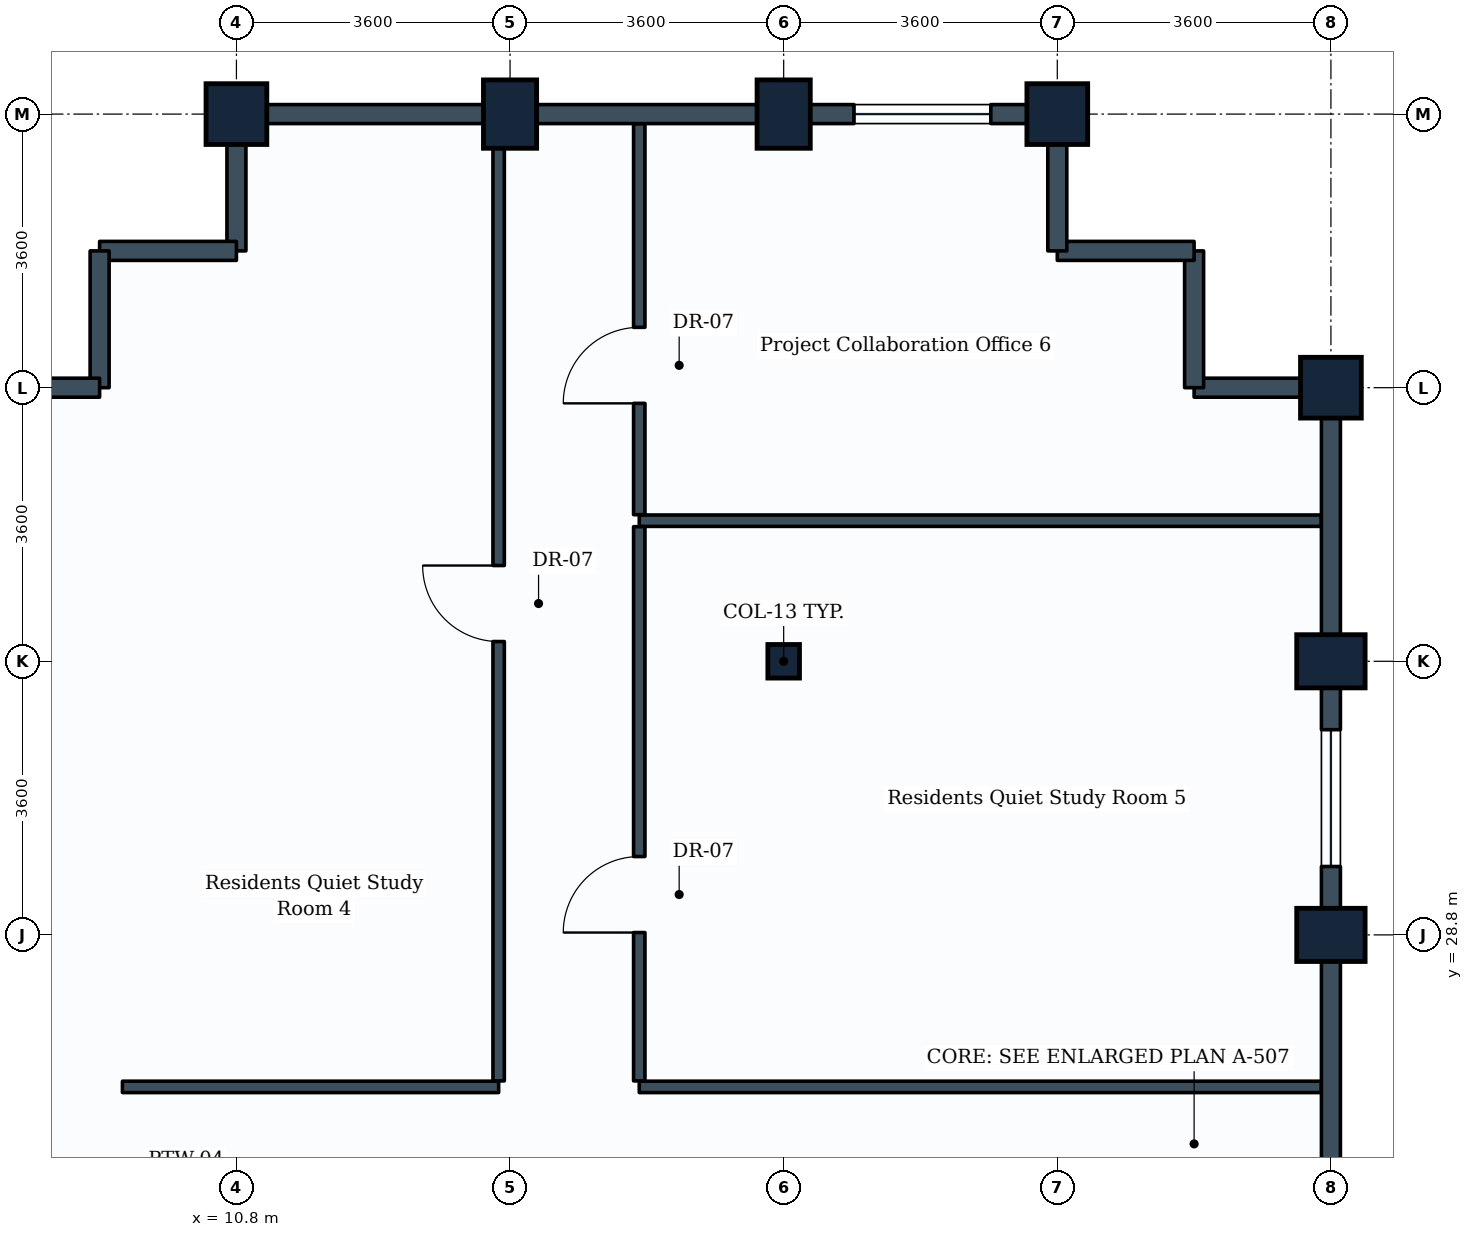
"""IFC4 building model, lengths in metres.
Left out: names, types, materials, properties, quantities, classifications, styles, units other than length and angle.
Written with IfcOpenShell. Run it as: python <this file> out.ifc"""

import sys

from ifc_helpers import new_model, si_unit, direction, frame, frame_2d, origin, origin_2d, place, context, subcontext, project, spatial, rectangle, i_section, extrude, element, fill, save


model = new_model("IFC4")
c1 = context("Model", 3, precision=1e-05, world=origin(), true_north=direction((0.0, 1.0)))
c2 = subcontext(c1, "Body", "Model", "MODEL_VIEW")
j1 = project(units=[si_unit("LENGTHUNIT", "METRE"), si_unit("PLANEANGLEUNIT", "RADIAN")], contexts=[c1])
p1 = place(None, origin())
s1 = spatial("IfcSite", under=j1, at=p1, CompositionType="ELEMENT")
p2 = place(p1, origin())
s2 = spatial("IfcBuilding", under=s1, at=p2, CompositionType="ELEMENT")
p3 = place(p2, frame((0.0, 0.0, 190.0)))
s3 = spatial("IfcBuildingStorey", under=s2, at=p3, CompositionType="ELEMENT", Elevation=190.0)
p4 = place(p3, frame((10.8, 39.6, 0.0), z_axis=(0.0, 0.0, 1.0), x_axis=(1.0, 0.0, 0.0)))
e1 = element("IfcColumn", 1, at=p4, inside=s3, PredefinedType="COLUMN", context=c2, shape_type="SweptSolid", body=[
    extrude(rectangle(XDim=0.8, YDim=0.8, at=origin_2d()), origin(), (0.0, 0.0, 1.0), 3.8),
])
p5 = place(p3, frame((14.4, 39.6, 0.0), z_axis=(0.0, 0.0, 1.0), x_axis=(1.0, 0.0, 0.0)))
e2 = element("IfcColumn", 2, at=p5, inside=s3, PredefinedType="COLUMN", context=c2, shape_type="SweptSolid", body=[
    extrude(rectangle(XDim=0.7, YDim=0.9, at=origin_2d()), origin(), (0.0, 0.0, 1.0), 3.8),
])
p6 = place(p3, frame((18.0, 32.4, 0.0), z_axis=(0.0, 0.0, 1.0), x_axis=(1.0, 0.0, 0.0)))
e3 = element("IfcColumn", 3, at=p6, inside=s3, PredefinedType="COLUMN", context=c2, shape_type="SweptSolid", body=[
    extrude(i_section(OverallWidth=0.416, OverallDepth=0.442, WebThickness=0.025, FlangeThickness=0.041, FilletRadius=0.015, at=origin_2d()), origin(), (0.0, 0.0, 1.0), 3.8),
])
p7 = place(p3, frame((18.0, 39.6, 0.0), z_axis=(0.0, 0.0, 1.0), x_axis=(1.0, 0.0, 0.0)))
e4 = element("IfcColumn", 4, at=p7, inside=s3, PredefinedType="COLUMN", context=c2, shape_type="SweptSolid", body=[
    extrude(rectangle(XDim=0.7, YDim=0.9, at=origin_2d()), origin(), (0.0, 0.0, 1.0), 3.8),
])
p8 = place(p3, frame((21.6, 39.6, 0.0), z_axis=(0.0, 0.0, 1.0), x_axis=(1.0, 0.0, 0.0)))
e5 = element("IfcColumn", 5, at=p8, inside=s3, PredefinedType="COLUMN", context=c2, shape_type="SweptSolid", body=[
    extrude(rectangle(XDim=0.8, YDim=0.8, at=origin_2d()), origin(), (0.0, 0.0, 1.0), 3.8),
])
for number, where, z_axis, x_axis in (
    (6, (25.2, 28.8, 0.0), (0.0, 0.0, 1.0), (0.0, 1.0, 0.0)),
    (7, (25.2, 32.4, 0.0), (0.0, 0.0, 1.0), (0.0, 1.0, 0.0)),
):
    element("IfcColumn", number, at=place(p3, frame(where, z_axis=z_axis, x_axis=x_axis)), inside=s3, PredefinedType="COLUMN", context=c2, shape_type="SweptSolid", body=[
        extrude(rectangle(XDim=0.7, YDim=0.9, at=origin_2d()), origin(), (0.0, 0.0, 1.0), 3.8),
    ])
p9 = place(p3, frame((25.2, 36.0, 0.0), z_axis=(0.0, 0.0, 1.0), x_axis=(0.0, 1.0, 0.0)))
e8 = element("IfcColumn", 8, at=p9, inside=s3, PredefinedType="COLUMN", context=c2, shape_type="SweptSolid", body=[
    extrude(rectangle(XDim=0.8, YDim=0.8, at=origin_2d()), origin(), (0.0, 0.0, 1.0), 3.8),
])
p10 = place(p3, frame((25.2, 25.2, 0.0), z_axis=(0.0, 0.0, 1.0), x_axis=(0.0, 1.0, 0.0)))
e9 = element("IfcWall", 9, at=p10, inside=s3, PredefinedType="STANDARD", context=c2, shape_type="SweptSolid", body=[
    extrude(rectangle(XDim=3.6, YDim=0.25, at=frame_2d((1.8, 0.0))), origin(), (0.0, 0.0, 1.0), 2.93),
])
p11 = place(p3, frame((25.2, 28.8, 0.0), z_axis=(0.0, 0.0, 1.0), x_axis=(0.0, 1.0, 0.0)))
e10 = element("IfcWall", 10, at=p11, inside=s3, PredefinedType="STANDARD", context=c2, shape_type="SweptSolid", body=[
    extrude(rectangle(XDim=3.6, YDim=0.25, at=frame_2d((1.8, 0.0))), origin(), (0.0, 0.0, 1.0), 2.93),
])
p12 = place(p11, frame((0.9, 0.0, 0.85)))
e11 = element("IfcOpeningElement", 11, at=p12, cuts=e10, PredefinedType="OPENING", context=c2, shape_type="SweptSolid", body=[
    extrude(rectangle(XDim=1.8, YDim=1.35, at=frame_2d((0.9, 0.675))), frame((0.0, 0.135, 0.0), z_axis=(0.0, -1.0, 0.0), x_axis=(1.0, 0.0, 0.0)), (0.0, 0.0, 1.0), 0.27),
])
p13 = place(p3, frame((25.2, 32.4, 0.0), z_axis=(0.0, 0.0, 1.0), x_axis=(0.0, 1.0, 0.0)))
e12 = element("IfcWall", 12, at=p13, inside=s3, PredefinedType="STANDARD", context=c2, shape_type="SweptSolid", body=[
    extrude(rectangle(XDim=3.6, YDim=0.25, at=frame_2d((1.8, 0.0))), origin(), (0.0, 0.0, 1.0), 2.93),
])
p14 = place(p3, frame((23.4, 36.0, 0.0), z_axis=(0.0, 0.0, 1.0), x_axis=(1.0, 0.0, 0.0)))
e13 = element("IfcWall", 13, at=p14, inside=s3, PredefinedType="STANDARD", context=c2, shape_type="SweptSolid", body=[
    extrude(rectangle(XDim=1.8, YDim=0.25, at=frame_2d((0.9, 0.0))), origin(), (0.0, 0.0, 1.0), 2.93),
])
p15 = place(p3, frame((23.4, 36.0, 0.0), z_axis=(0.0, 0.0, 1.0), x_axis=(0.0, 1.0, 0.0)))
e14 = element("IfcWall", 14, at=p15, inside=s3, PredefinedType="STANDARD", context=c2, shape_type="SweptSolid", body=[
    extrude(rectangle(XDim=1.8, YDim=0.25, at=frame_2d((0.9, 0.0))), origin(), (0.0, 0.0, 1.0), 3.535),
])
p16 = place(p3, frame((21.6, 37.8, 0.0), z_axis=(0.0, 0.0, 1.0), x_axis=(1.0, 0.0, 0.0)))
e15 = element("IfcWall", 15, at=p16, inside=s3, PredefinedType="STANDARD", context=c2, shape_type="SweptSolid", body=[
    extrude(rectangle(XDim=1.8, YDim=0.25, at=frame_2d((0.9, 0.0))), origin(), (0.0, 0.0, 1.0), 3.535),
])
p17 = place(p3, frame((21.6, 37.8, 0.0), z_axis=(0.0, 0.0, 1.0), x_axis=(0.0, 1.0, 0.0)))
e16 = element("IfcWall", 16, at=p17, inside=s3, PredefinedType="STANDARD", context=c2, shape_type="SweptSolid", body=[
    extrude(rectangle(XDim=1.8, YDim=0.25, at=frame_2d((0.9, 0.0))), origin(), (0.0, 0.0, 1.0), 2.93),
])
p18 = place(p3, frame((18.0, 39.6, 0.0), z_axis=(0.0, 0.0, 1.0), x_axis=(1.0, 0.0, 0.0)))
e17 = element("IfcWall", 17, at=p18, inside=s3, PredefinedType="STANDARD", context=c2, shape_type="SweptSolid", body=[
    extrude(rectangle(XDim=3.6, YDim=0.25, at=frame_2d((1.8, 0.0))), origin(), (0.0, 0.0, 1.0), 2.93),
])
p19 = place(p18, frame((0.925, 0.0, 0.85)))
e18 = element("IfcOpeningElement", 18, at=p19, cuts=e17, PredefinedType="OPENING", context=c2, shape_type="SweptSolid", body=[
    extrude(rectangle(XDim=1.8, YDim=1.35, at=frame_2d((0.9, 0.675))), frame((0.0, 0.135, 0.0), z_axis=(0.0, -1.0, 0.0), x_axis=(1.0, 0.0, 0.0)), (0.0, 0.0, 1.0), 0.27),
])
p20 = place(p3, frame((14.4, 39.6, 0.0), z_axis=(0.0, 0.0, 1.0), x_axis=(1.0, 0.0, 0.0)))
e19 = element("IfcWall", 19, at=p20, inside=s3, PredefinedType="STANDARD", context=c2, shape_type="SweptSolid", body=[
    extrude(rectangle(XDim=3.6, YDim=0.25, at=frame_2d((1.8, 0.0))), origin(), (0.0, 0.0, 1.0), 2.93),
])
p21 = place(p3, frame((10.8, 39.6, 0.0), z_axis=(0.0, 0.0, 1.0), x_axis=(1.0, 0.0, 0.0)))
e20 = element("IfcWall", 20, at=p21, inside=s3, PredefinedType="STANDARD", context=c2, shape_type="SweptSolid", body=[
    extrude(rectangle(XDim=3.6, YDim=0.25, at=frame_2d((1.8, 0.0))), origin(), (0.0, 0.0, 1.0), 2.93),
])
p22 = place(p3, frame((10.8, 37.8, 0.0), z_axis=(0.0, 0.0, 1.0), x_axis=(0.0, 1.0, 0.0)))
e21 = element("IfcWall", 21, at=p22, inside=s3, PredefinedType="STANDARD", context=c2, shape_type="SweptSolid", body=[
    extrude(rectangle(XDim=1.8, YDim=0.25, at=frame_2d((0.9, 0.0))), origin(), (0.0, 0.0, 1.0), 2.93),
])
for number, where, z_axis, x_axis in (
    (22, (9.0, 37.8, 0.0), (0.0, 0.0, 1.0), (1.0, 0.0, 0.0)),
    (23, (9.0, 36.0, 0.0), (0.0, 0.0, 1.0), (0.0, 1.0, 0.0)),
):
    element("IfcWall", number, at=place(p3, frame(where, z_axis=z_axis, x_axis=x_axis)), inside=s3, PredefinedType="STANDARD", context=c2, shape_type="SweptSolid", body=[
        extrude(rectangle(XDim=1.8, YDim=0.25, at=frame_2d((0.9, 0.0))), origin(), (0.0, 0.0, 1.0), 3.535),
    ])
p23 = place(p3, frame((7.2, 36.0, 0.0), z_axis=(0.0, 0.0, 1.0), x_axis=(1.0, 0.0, 0.0)))
e24 = element("IfcWall", 24, at=p23, inside=s3, PredefinedType="STANDARD", context=c2, shape_type="SweptSolid", body=[
    extrude(rectangle(XDim=1.8, YDim=0.25, at=frame_2d((0.9, 0.0))), origin(), (0.0, 0.0, 1.0), 2.93),
])
p24 = place(p3, frame((9.3, 26.8, 0.0), z_axis=(0.0, 0.0, 1.0), x_axis=(1.0, 0.0, 0.0)))
e25 = element("IfcWall", 25, at=p24, inside=s3, PredefinedType="PARTITIONING", context=c2, shape_type="SweptSolid", body=[
    extrude(rectangle(XDim=4.95, YDim=0.15, at=frame_2d((2.475, 0.0))), origin(), (0.0, 0.0, 1.0), 3.535),
])
p25 = place(p3, frame((14.25, 26.879, 0.0), z_axis=(0.0, 0.0, 1.0), x_axis=(0.0, 1.0, 0.0)))
e26 = element("IfcWall", 26, at=p25, inside=s3, PredefinedType="PARTITIONING", context=c2, shape_type="SweptSolid", body=[
    extrude(rectangle(XDim=12.592, YDim=0.15, at=frame_2d((6.296, 0.0))), origin(), (0.0, 0.0, 1.0), 2.93),
])
p26 = place(p25, frame((5.781, 0.0, 0.0)))
e27 = element("IfcOpeningElement", 27, at=p26, cuts=e26, PredefinedType="OPENING", context=c2, shape_type="SweptSolid", body=[
    extrude(rectangle(XDim=1.0, YDim=2.1, at=frame_2d((0.5, 1.05))), frame((0.0, 0.085, 0.0), z_axis=(0.0, -1.0, 0.0), x_axis=(1.0, 0.0, 0.0)), (0.0, 0.0, 1.0), 0.17),
])
for number, where, z_axis, x_axis in (
    (28, (16.1, 26.8, 0.0), (0.0, 0.0, 1.0), (1.0, 0.0, 0.0)),
    (29, (16.1, 34.25, 0.0), (0.0, 0.0, 1.0), (1.0, 0.0, 0.0)),
):
    element("IfcWall", number, at=place(p3, frame(where, z_axis=z_axis, x_axis=x_axis)), inside=s3, PredefinedType="PARTITIONING", context=c2, shape_type="SweptSolid", body=[
        extrude(rectangle(XDim=8.971, YDim=0.15, at=frame_2d((4.485, 0.0))), origin(), (0.0, 0.0, 1.0), 2.93),
    ])
p27 = place(p3, frame((16.1, 26.879, 0.0), z_axis=(0.0, 0.0, 1.0), x_axis=(0.0, 1.0, 0.0)))
e30 = element("IfcWall", 30, at=p27, inside=s3, PredefinedType="PARTITIONING", context=c2, shape_type="SweptSolid", body=[
    extrude(rectangle(XDim=7.292, YDim=0.15, at=frame_2d((3.646, 0.0))), origin(), (0.0, 0.0, 1.0), 3.17),
])
p28 = place(p27, frame((1.952, 0.0, 0.0)))
e31 = element("IfcOpeningElement", 31, at=p28, cuts=e30, PredefinedType="OPENING", context=c2, shape_type="SweptSolid", body=[
    extrude(rectangle(XDim=1.0, YDim=2.1, at=frame_2d((0.5, 1.05))), frame((0.0, 0.085, 0.0), z_axis=(0.0, -1.0, 0.0), x_axis=(1.0, 0.0, 0.0)), (0.0, 0.0, 1.0), 0.17),
])
p29 = place(p3, frame((16.1, 34.329, 0.0), z_axis=(0.0, 0.0, 1.0), x_axis=(0.0, 1.0, 0.0)))
e32 = element("IfcWall", 32, at=p29, inside=s3, PredefinedType="PARTITIONING", context=c2, shape_type="SweptSolid", body=[
    extrude(rectangle(XDim=5.142, YDim=0.15, at=frame_2d((2.571, 0.0))), origin(), (0.0, 0.0, 1.0), 2.93),
])
p30 = place(p29, frame((1.465, 0.0, 0.0)))
e33 = element("IfcOpeningElement", 33, at=p30, cuts=e32, PredefinedType="OPENING", context=c2, shape_type="SweptSolid", body=[
    extrude(rectangle(XDim=1.0, YDim=2.1, at=frame_2d((0.5, 1.05))), frame((0.0, 0.085, 0.0), z_axis=(0.0, -1.0, 0.0), x_axis=(1.0, 0.0, 0.0)), (0.0, 0.0, 1.0), 0.17),
])
p31 = place(p12, origin())
e34 = element("IfcWindow", 34, at=p31, inside=s3, PartitioningType="SINGLE_PANEL", PredefinedType="WINDOW", context=c2, shape_type="SweptSolid", body=[
    extrude(rectangle(XDim=1.8, YDim=1.35, at=frame_2d((0.9, 0.675))), frame((0.0, 0.03, 0.0), z_axis=(0.0, -1.0, 0.0), x_axis=(1.0, 0.0, 0.0)), (0.0, 0.0, 1.0), 0.06),
])
fill(e11, e34)
p32 = place(p19, origin())
e35 = element("IfcWindow", 35, at=p32, inside=s3, PartitioningType="SINGLE_PANEL", PredefinedType="WINDOW", context=c2, shape_type="SweptSolid", body=[
    extrude(rectangle(XDim=1.8, YDim=1.35, at=frame_2d((0.9, 0.675))), frame((0.0, 0.03, 0.0), z_axis=(0.0, -1.0, 0.0), x_axis=(1.0, 0.0, 0.0)), (0.0, 0.0, 1.0), 0.06),
])
fill(e18, e35)
p33 = place(p26, origin())
e36 = element("IfcDoor", 36, at=p33, inside=s3, OperationType="SINGLE_SWING_RIGHT", PredefinedType="DOOR", context=c2, shape_type="SweptSolid", body=[
    extrude(rectangle(XDim=1.0, YDim=2.1, at=frame_2d((0.5, 1.05))), frame((0.0, 0.025, 0.0), z_axis=(0.0, -1.0, 0.0), x_axis=(1.0, 0.0, 0.0)), (0.0, 0.0, 1.0), 0.05),
])
fill(e27, e36)
p34 = place(p28, origin())
e37 = element("IfcDoor", 37, at=p34, inside=s3, OperationType="SINGLE_SWING_LEFT", PredefinedType="DOOR", context=c2, shape_type="SweptSolid", body=[
    extrude(rectangle(XDim=1.0, YDim=2.1, at=frame_2d((0.5, 1.05))), frame((0.0, 0.025, 0.0), z_axis=(0.0, -1.0, 0.0), x_axis=(1.0, 0.0, 0.0)), (0.0, 0.0, 1.0), 0.05),
])
fill(e31, e37)
p35 = place(p30, origin())
e38 = element("IfcDoor", 38, at=p35, inside=s3, OperationType="SINGLE_SWING_LEFT", PredefinedType="DOOR", context=c2, shape_type="SweptSolid", body=[
    extrude(rectangle(XDim=1.0, YDim=2.1, at=frame_2d((0.5, 1.05))), frame((0.0, 0.025, 0.0), z_axis=(0.0, -1.0, 0.0), x_axis=(1.0, 0.0, 0.0)), (0.0, 0.0, 1.0), 0.05),
])
fill(e33, e38)
save(model, sys.argv[1])
